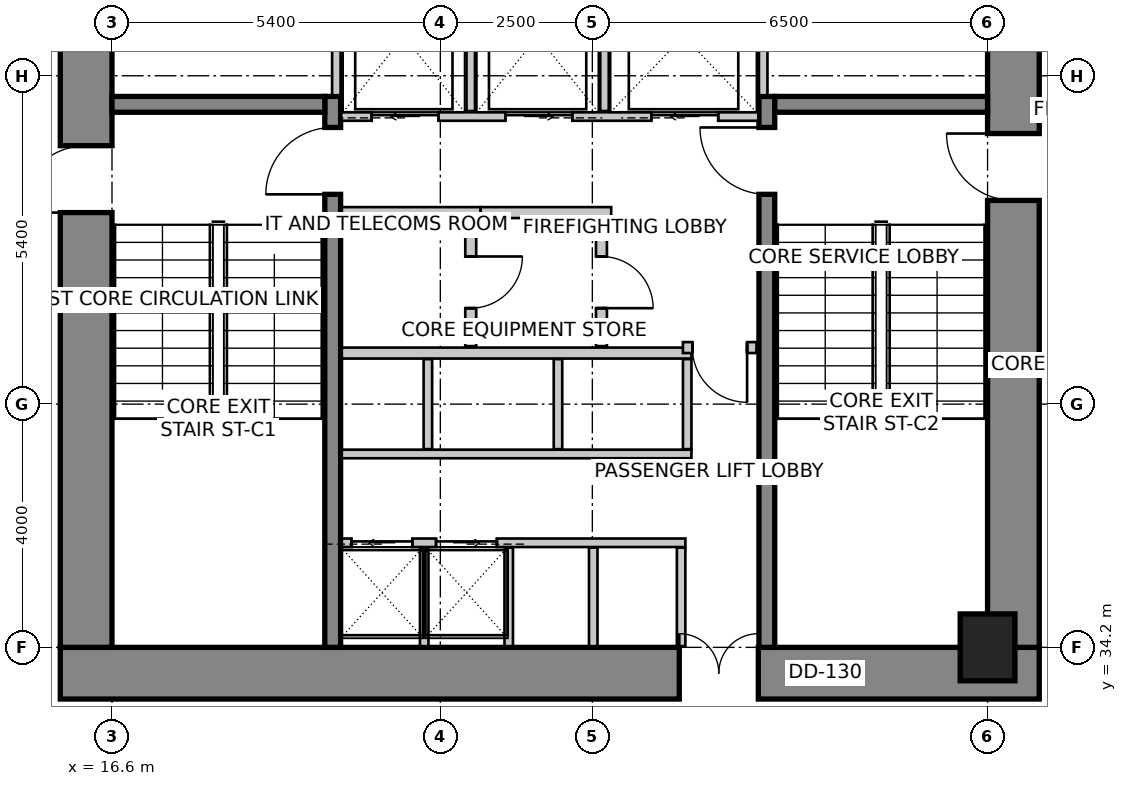
"""IFC4 building model, lengths in metres.
Left out: names, types, materials, properties, quantities, classifications, styles, units other than length and angle.
Written with IfcOpenShell. Run it as: python <this file> out.ifc"""

import sys

from ifc_helpers import new_model, si_unit, direction, frame, frame_2d, origin, origin_2d, place, context, subcontext, project, spatial, rectangle, extrude, source, transform, mapped, element, fill, save


model = new_model("IFC4")
c1 = context("Model", 3, precision=1e-05, world=origin(), true_north=direction((0.0, 1.0)))
c2 = subcontext(c1, "Body", "Model", "MODEL_VIEW")
j1 = project(units=[si_unit("LENGTHUNIT", "METRE"), si_unit("PLANEANGLEUNIT", "RADIAN")], contexts=[c1])
p1 = place(None, origin())
s1 = spatial("IfcSite", under=j1, at=p1, CompositionType="ELEMENT")
p2 = place(p1, origin())
s2 = spatial("IfcBuilding", under=s1, at=p2, CompositionType="ELEMENT")
p3 = place(p2, frame((0.0, 0.0, 59.0)))
s3 = spatial("IfcBuildingStorey", under=s2, at=p3, CompositionType="ELEMENT", Elevation=59.0)
p4 = place(p3, frame((15.75, 33.775, 0.0), z_axis=(0.0, 0.0, 1.0), x_axis=(1.0, 0.0, 0.0)))
e1 = element("IfcWall", 1, at=p4, inside=s3, PredefinedType="SHEAR", context=c2, shape_type="SweptSolid", body=[
    extrude(rectangle(XDim=16.1, YDim=0.85, at=frame_2d((8.05, 0.0))), origin(), (0.0, 0.0, 1.0), 4.0),
])
m1 = source(origin(), c2, "Body", "SweptSolid", [
    extrude(rectangle(XDim=1.3, YDim=2.15, at=frame_2d((0.65, 1.075))), frame((0.0, 0.435, 0.0), z_axis=(0.0, -1.0, 0.0), x_axis=(1.0, 0.0, 0.0)), (0.0, 0.0, 1.0), 0.87),
])
p5 = place(p4, frame((10.18, 0.0, 0.0)))
e2 = element("IfcOpeningElement", 2, at=p5, cuts=e1, PredefinedType="OPENING", context=c2, shape_type="MappedRepresentation", body=[
    mapped(m1, transform((0.0, 0.0, 0.0), scale=1.0)),
])
p6 = place(p3, frame((16.175, 34.2, 0.0), z_axis=(0.0, 0.0, 1.0), x_axis=(0.0, 1.0, 0.0)))
e3 = element("IfcWall", 3, at=p6, inside=s3, PredefinedType="SHEAR", context=c2, shape_type="SweptSolid", body=[
    extrude(rectangle(XDim=11.4, YDim=0.85, at=frame_2d((5.7, 0.0))), origin(), (0.0, 0.0, 1.0), 4.0),
])
m2 = source(origin(), c2, "Body", "SweptSolid", [
    extrude(rectangle(XDim=1.1, YDim=2.15, at=frame_2d((0.55, 1.075))), frame((0.0, 0.435, 0.0), z_axis=(0.0, -1.0, 0.0), x_axis=(1.0, 0.0, 0.0)), (0.0, 0.0, 1.0), 0.87),
])
p7 = place(p6, frame((7.15, 0.0, 0.0)))
e4 = element("IfcOpeningElement", 4, at=p7, cuts=e3, PredefinedType="OPENING", context=c2, shape_type="MappedRepresentation", body=[
    mapped(m2, transform((0.0, 0.0, 0.0), scale=1.0)),
])
p8 = place(p3, frame((31.425, 34.2, 0.0), z_axis=(0.0, 0.0, 1.0), x_axis=(0.0, 1.0, 0.0)))
e5 = element("IfcWall", 5, at=p8, inside=s3, PredefinedType="SHEAR", context=c2, shape_type="SweptSolid", body=[
    extrude(rectangle(XDim=11.4, YDim=0.85, at=frame_2d((5.7, 0.0))), origin(), (0.0, 0.0, 1.0), 4.0),
])
p9 = place(p8, frame((7.35, 0.0, 0.0)))
e6 = element("IfcOpeningElement", 6, at=p9, cuts=e5, PredefinedType="OPENING", context=c2, shape_type="MappedRepresentation", body=[
    mapped(m2, transform((0.0, 0.0, 0.0), scale=1.0)),
])
p10 = place(p3, frame((20.23, 34.2, 0.0), z_axis=(0.0, 0.0, 1.0), x_axis=(0.0, 1.0, 0.0)))
e7 = element("IfcWall", 7, at=p10, inside=s3, PredefinedType="SHEAR", context=c2, shape_type="SweptSolid", body=[
    extrude(rectangle(XDim=9.06, YDim=0.26, at=frame_2d((4.53, 0.0))), origin(), (0.0, 0.0, 1.0), 4.0),
])
m3 = source(origin(), c2, "Body", "SweptSolid", [
    extrude(rectangle(XDim=1.1, YDim=2.15, at=frame_2d((0.55, 1.075))), frame((0.0, 0.14, 0.0), z_axis=(0.0, -1.0, 0.0), x_axis=(1.0, 0.0, 0.0)), (0.0, 0.0, 1.0), 0.28),
])
p11 = place(p10, frame((7.45, 0.0, 0.0)))
e8 = element("IfcOpeningElement", 8, at=p11, cuts=e7, PredefinedType="OPENING", context=c2, shape_type="MappedRepresentation", body=[
    mapped(m3, transform((0.0, 0.0, 0.0), scale=1.0)),
])
p12 = place(p3, frame((27.37, 34.2, 0.0), z_axis=(0.0, 0.0, 1.0), x_axis=(0.0, 1.0, 0.0)))
e9 = element("IfcWall", 9, at=p12, inside=s3, PredefinedType="SHEAR", context=c2, shape_type="SweptSolid", body=[
    extrude(rectangle(XDim=9.06, YDim=0.26, at=frame_2d((4.53, 0.0))), origin(), (0.0, 0.0, 1.0), 4.0),
])
p13 = place(p12, frame((7.45, 0.0, 0.0)))
e10 = element("IfcOpeningElement", 10, at=p13, cuts=e9, PredefinedType="OPENING", context=c2, shape_type="MappedRepresentation", body=[
    mapped(m3, transform((0.0, 0.0, 0.0), scale=1.0)),
])
for number, where, z_axis, x_axis in (
    (11, (16.6, 43.13, 0.0), (0.0, 0.0, 1.0), (1.0, 0.0, 0.0)),
    (12, (27.5, 43.13, 0.0), (0.0, 0.0, 1.0), (1.0, 0.0, 0.0)),
):
    element("IfcWall", number, at=place(p3, frame(where, z_axis=z_axis, x_axis=x_axis)), inside=s3, PredefinedType="SHEAR", context=c2, shape_type="SweptSolid", body=[
        extrude(rectangle(XDim=3.5, YDim=0.26, at=frame_2d((1.75, 0.0))), origin(), (0.0, 0.0, 1.0), 4.0),
    ])
m4 = source(origin(), c2, "Body", "SweptSolid", [
    extrude(rectangle(XDim=0.9, YDim=1.1, at=origin_2d()), origin(), (0.0, 0.0, 1.0), 4.0),
])
p14 = place(p3, frame((31.0, 34.2, 0.0), z_axis=(0.0, 0.0, 1.0), x_axis=(1.0, 0.0, 0.0)))
e13 = element("IfcColumn", 13, at=p14, inside=s3, PredefinedType="COLUMN", context=c2, shape_type="MappedRepresentation", body=[
    mapped(m4, transform((0.0, 0.0, 0.0), scale=1.0)),
])
p15 = place(p3, frame((20.37, 42.93, 0.0), z_axis=(0.0, 0.0, 1.0), x_axis=(1.0, 0.0, 0.0)))
e14 = element("IfcWall", 14, at=p15, inside=s3, PredefinedType="SOLIDWALL", context=c2, shape_type="SweptSolid", body=[
    extrude(rectangle(XDim=6.86, YDim=0.14, at=frame_2d((3.43, 0.0))), origin(), (0.0, 0.0, 1.0), 3.7),
])
m5 = source(origin(), c2, "Body", "SweptSolid", [
    extrude(rectangle(XDim=1.1, YDim=2.15, at=frame_2d((0.55, 1.075))), frame((0.0, 0.08, 0.0), z_axis=(0.0, -1.0, 0.0), x_axis=(1.0, 0.0, 0.0)), (0.0, 0.0, 1.0), 0.16),
])
p16 = place(p15, frame((0.5, 0.0, 0.0)))
e15 = element("IfcOpeningElement", 15, at=p16, cuts=e14, PredefinedType="OPENING", context=c2, shape_type="MappedRepresentation", body=[
    mapped(m5, transform((0.0, 0.0, 0.0), scale=1.0)),
])
p17 = place(p15, frame((2.7, 0.0, 0.0)))
e16 = element("IfcOpeningElement", 16, at=p17, cuts=e14, PredefinedType="OPENING", context=c2, shape_type="MappedRepresentation", body=[
    mapped(m5, transform((0.0, 0.0, 0.0), scale=1.0)),
])
p18 = place(p15, frame((5.1, 0.0, 0.0)))
e17 = element("IfcOpeningElement", 17, at=p18, cuts=e14, PredefinedType="OPENING", context=c2, shape_type="MappedRepresentation", body=[
    mapped(m5, transform((0.0, 0.0, 0.0), scale=1.0)),
])
for number, where, z_axis, x_axis in (
    (18, (20.29, 43.28, 0.0), (0.0, 0.0, 1.0), (0.0, 1.0, 0.0)),
    (19, (27.31, 43.28, 0.0), (0.0, 0.0, 1.0), (0.0, 1.0, 0.0)),
):
    element("IfcWall", number, at=place(p3, frame(where, z_axis=z_axis, x_axis=x_axis)), inside=s3, PredefinedType="SOLIDWALL", context=c2, shape_type="SweptSolid", body=[
        extrude(rectangle(XDim=2.3, YDim=0.14, at=frame_2d((1.15, 0.0))), origin(), (0.0, 0.0, 1.0), 3.7),
    ])
for number, where, z_axis, x_axis in (
    (20, (22.5, 43.02, 0.0), (0.0, 0.0, 1.0), (0.0, 1.0, 0.0)),
    (21, (24.7, 43.02, 0.0), (0.0, 0.0, 1.0), (0.0, 1.0, 0.0)),
):
    element("IfcWall", number, at=place(p3, frame(where, z_axis=z_axis, x_axis=x_axis)), inside=s3, PredefinedType="SOLIDWALL", context=c2, shape_type="SweptSolid", body=[
        extrude(rectangle(XDim=2.56, YDim=0.14, at=frame_2d((1.28, 0.0))), origin(), (0.0, 0.0, 1.0), 3.7),
    ])
p19 = place(p3, frame((20.38, 35.92, 0.0), z_axis=(0.0, 0.0, 1.0), x_axis=(1.0, 0.0, 0.0)))
e22 = element("IfcWall", 22, at=p19, inside=s3, PredefinedType="SOLIDWALL", context=c2, shape_type="SweptSolid", body=[
    extrude(rectangle(XDim=5.65, YDim=0.14, at=frame_2d((2.825, 0.0))), origin(), (0.0, 0.0, 1.0), 3.7),
])
m6 = source(origin(), c2, "Body", "SweptSolid", [
    extrude(rectangle(XDim=1.0, YDim=2.15, at=frame_2d((0.5, 1.075))), frame((0.0, 0.08, 0.0), z_axis=(0.0, -1.0, 0.0), x_axis=(1.0, 0.0, 0.0)), (0.0, 0.0, 1.0), 0.16),
])
p20 = place(p19, frame((0.16, 0.0, 0.0)))
e23 = element("IfcOpeningElement", 23, at=p20, cuts=e22, PredefinedType="OPENING", context=c2, shape_type="MappedRepresentation", body=[
    mapped(m6, transform((0.0, 0.0, 0.0), scale=1.0)),
])
p21 = place(p19, frame((1.55, 0.0, 0.0)))
e24 = element("IfcOpeningElement", 24, at=p21, cuts=e22, PredefinedType="OPENING", context=c2, shape_type="MappedRepresentation", body=[
    mapped(m6, transform((0.0, 0.0, 0.0), scale=1.0)),
])
for number, where, z_axis, x_axis in (
    (25, (25.96, 34.22, 0.0), (0.0, 0.0, 1.0), (0.0, 1.0, 0.0)),
    (26, (21.735, 34.22, 0.0), (0.0, 0.0, 1.0), (0.0, 1.0, 0.0)),
    (27, (23.125, 34.22, 0.0), (0.0, 0.0, 1.0), (0.0, 1.0, 0.0)),
    (28, (24.515, 34.22, 0.0), (0.0, 0.0, 1.0), (0.0, 1.0, 0.0)),
):
    element("IfcWall", number, at=place(p3, frame(where, z_axis=z_axis, x_axis=x_axis)), inside=s3, PredefinedType="SOLIDWALL", context=c2, shape_type="SweptSolid", body=[
        extrude(rectangle(XDim=1.62, YDim=0.14, at=frame_2d((0.81, 0.0))), origin(), (0.0, 0.0, 1.0), 2.992),
    ])
p22 = place(p3, frame((20.38, 37.38, 0.0), z_axis=(0.0, 0.0, 1.0), x_axis=(1.0, 0.0, 0.0)))
e29 = element("IfcWall", 29, at=p22, inside=s3, PredefinedType="SOLIDWALL", context=c2, shape_type="SweptSolid", body=[
    extrude(rectangle(XDim=5.75, YDim=0.14, at=frame_2d((2.875, 0.0))), origin(), (0.0, 0.0, 1.0), 3.7),
])
p23 = place(p3, frame((20.38, 39.04, 0.0), z_axis=(0.0, 0.0, 1.0), x_axis=(1.0, 0.0, 0.0)))
e30 = element("IfcWall", 30, at=p23, inside=s3, PredefinedType="SOLIDWALL", context=c2, shape_type="SweptSolid", body=[
    extrude(rectangle(XDim=5.75, YDim=0.18, at=frame_2d((2.875, 0.0))), origin(), (0.0, 0.0, 1.0), 3.7),
])
for number, where, z_axis, x_axis in (
    (31, (26.06, 37.46, 0.0), (0.0, 0.0, 1.0), (0.0, 1.0, 0.0)),
    (32, (21.795, 37.46, 0.0), (0.0, 0.0, 1.0), (0.0, 1.0, 0.0)),
    (33, (23.935, 37.46, 0.0), (0.0, 0.0, 1.0), (0.0, 1.0, 0.0)),
):
    element("IfcWall", number, at=place(p3, frame(where, z_axis=z_axis, x_axis=x_axis)), inside=s3, PredefinedType="SOLIDWALL", context=c2, shape_type="SweptSolid", body=[
        extrude(rectangle(XDim=1.48, YDim=0.14, at=frame_2d((0.74, 0.0))), origin(), (0.0, 0.0, 1.0), 3.7),
    ])
p24 = place(p3, frame((22.66, 41.35, 0.0), z_axis=(0.0, 0.0, 1.0), x_axis=(-1.0, 0.0, 0.0)))
e34 = element("IfcWall", 34, at=p24, inside=s3, PredefinedType="PARTITIONING", context=c2, shape_type="SweptSolid", body=[
    extrude(rectangle(XDim=2.28, YDim=0.18, at=frame_2d((1.14, 0.0))), origin(), (0.0, 0.0, 1.0), 3.7),
])
p25 = place(p3, frame((24.81, 41.35, 0.0), z_axis=(0.0, 0.0, 1.0), x_axis=(-1.0, 0.0, 0.0)))
e35 = element("IfcWall", 35, at=p25, inside=s3, PredefinedType="PARTITIONING", context=c2, shape_type="SweptSolid", body=[
    extrude(rectangle(XDim=2.148, YDim=0.18, at=frame_2d((1.074, 0.0))), origin(), (0.0, 0.0, 1.0), 3.7),
])
p26 = place(p3, frame((22.5, 41.256, 0.0), z_axis=(0.0, 0.0, 1.0), x_axis=(0.0, -1.0, 0.0)))
e36 = element("IfcWall", 36, at=p26, inside=s3, PredefinedType="PARTITIONING", context=c2, shape_type="SweptSolid", body=[
    extrude(rectangle(XDim=2.106, YDim=0.18, at=frame_2d((1.053, 0.0))), origin(), (0.0, 0.0, 1.0), 3.7),
])
m7 = source(origin(), c2, "Body", "SweptSolid", [
    extrude(rectangle(XDim=0.85, YDim=2.15, at=frame_2d((0.425, 1.075))), frame((0.0, 0.1, 0.0), z_axis=(0.0, -1.0, 0.0), x_axis=(1.0, 0.0, 0.0)), (0.0, 0.0, 1.0), 0.2),
])
p27 = place(p26, frame((0.628, 0.0, 0.0)))
e37 = element("IfcOpeningElement", 37, at=p27, cuts=e36, PredefinedType="OPENING", context=c2, shape_type="MappedRepresentation", body=[
    mapped(m7, transform((0.0, 0.0, 0.0), scale=1.0)),
])
p28 = place(p3, frame((24.65, 41.256, 0.0), z_axis=(0.0, 0.0, 1.0), x_axis=(0.0, -1.0, 0.0)))
e38 = element("IfcWall", 38, at=p28, inside=s3, PredefinedType="PARTITIONING", context=c2, shape_type="SweptSolid", body=[
    extrude(rectangle(XDim=2.106, YDim=0.18, at=frame_2d((1.053, 0.0))), origin(), (0.0, 0.0, 1.0), 3.7),
])
p29 = place(p28, frame((0.628, 0.0, 0.0)))
e39 = element("IfcOpeningElement", 39, at=p29, cuts=e38, PredefinedType="OPENING", context=c2, shape_type="MappedRepresentation", body=[
    mapped(m7, transform((0.0, 0.0, 0.0), scale=1.0)),
])
p30 = place(p3, frame((27.2, 39.13, 0.0), z_axis=(0.0, 0.0, 1.0), x_axis=(-1.0, 0.0, 0.0)))
e40 = element("IfcWall", 40, at=p30, inside=s3, PredefinedType="PARTITIONING", context=c2, shape_type="SweptSolid", body=[
    extrude(rectangle(XDim=1.21, YDim=0.18, at=frame_2d((0.605, 0.0))), origin(), (0.0, 0.0, 1.0), 3.7),
])
m8 = source(origin(), c2, "Body", "SweptSolid", [
    extrude(rectangle(XDim=0.9, YDim=2.15, at=frame_2d((0.45, 1.075))), frame((0.0, 0.1, 0.0), z_axis=(0.0, -1.0, 0.0), x_axis=(1.0, 0.0, 0.0)), (0.0, 0.0, 1.0), 0.2),
])
p31 = place(p30, frame((0.155, 0.0, 0.0)))
e41 = element("IfcOpeningElement", 41, at=p31, cuts=e40, PredefinedType="OPENING", context=c2, shape_type="MappedRepresentation", body=[
    mapped(m8, transform((0.0, 0.0, 0.0), scale=1.0)),
])
m9 = source(origin(), c2, "Body", "SweptSolid", [
    extrude(rectangle(XDim=1.1, YDim=2.15, at=frame_2d((0.55, 1.075))), frame((0.0, 0.025, 0.0), z_axis=(0.0, -1.0, 0.0), x_axis=(1.0, 0.0, 0.0)), (0.0, 0.0, 1.0), 0.05),
])
p32 = place(p16, origin())
e42 = element("IfcDoor", 42, at=p32, inside=s3, OperationType="SLIDING_TO_LEFT", PredefinedType="DOOR", context=c2, shape_type="MappedRepresentation", body=[
    mapped(m9, transform((0.0, 0.0, 0.0), scale=1.0)),
])
fill(e15, e42)
p33 = place(p17, origin())
e43 = element("IfcDoor", 43, at=p33, inside=s3, OperationType="SLIDING_TO_RIGHT", PredefinedType="DOOR", context=c2, shape_type="MappedRepresentation", body=[
    mapped(m9, transform((0.0, 0.0, 0.0), scale=1.0)),
])
fill(e16, e43)
m10 = source(origin(), c2, "Body", "SweptSolid", [
    extrude(rectangle(XDim=1.1, YDim=2.15, at=frame_2d((0.55, 1.075))), frame((0.0, 0.025, 0.0), z_axis=(0.0, -1.0, 0.0), x_axis=(1.0, 0.0, 0.0)), (0.0, 0.0, 1.0), 0.05),
])
p34 = place(p18, origin())
e44 = element("IfcDoor", 44, at=p34, inside=s3, OperationType="SLIDING_TO_LEFT", PredefinedType="DOOR", context=c2, shape_type="MappedRepresentation", body=[
    mapped(m10, transform((0.0, 0.0, 0.0), scale=1.0)),
])
fill(e17, e44)
m11 = source(origin(), c2, "Body", "SweptSolid", [
    extrude(rectangle(XDim=1.0, YDim=2.15, at=frame_2d((0.5, 1.075))), frame((0.0, 0.025, 0.0), z_axis=(0.0, -1.0, 0.0), x_axis=(1.0, 0.0, 0.0)), (0.0, 0.0, 1.0), 0.05),
])
p35 = place(p20, origin())
e45 = element("IfcDoor", 45, at=p35, inside=s3, OperationType="SLIDING_TO_LEFT", PredefinedType="DOOR", context=c2, shape_type="MappedRepresentation", body=[
    mapped(m11, transform((0.0, 0.0, 0.0), scale=1.0)),
])
fill(e23, e45)
p36 = place(p21, origin())
e46 = element("IfcDoor", 46, at=p36, inside=s3, OperationType="SLIDING_TO_RIGHT", PredefinedType="DOOR", context=c2, shape_type="MappedRepresentation", body=[
    mapped(m11, transform((0.0, 0.0, 0.0), scale=1.0)),
])
fill(e24, e46)
m12 = source(origin(), c2, "Body", "SweptSolid", [
    extrude(rectangle(XDim=1.1, YDim=2.15, at=frame_2d((0.55, 1.075))), frame((0.0, 0.025, 0.0), z_axis=(0.0, -1.0, 0.0), x_axis=(1.0, 0.0, 0.0)), (0.0, 0.0, 1.0), 0.05),
])
p37 = place(p11, origin())
e47 = element("IfcDoor", 47, at=p37, inside=s3, OperationType="SINGLE_SWING_LEFT", PredefinedType="DOOR", context=c2, shape_type="MappedRepresentation", body=[
    mapped(m12, transform((0.0, 0.0, 0.0), scale=1.0)),
])
fill(e8, e47)
p38 = place(p13, origin())
e48 = element("IfcDoor", 48, at=p38, inside=s3, OperationType="SINGLE_SWING_RIGHT", PredefinedType="DOOR", context=c2, shape_type="MappedRepresentation", body=[
    mapped(m12, transform((0.0, 0.0, 0.0), scale=1.0)),
])
fill(e10, e48)
p39 = place(p7, origin())
e49 = element("IfcDoor", 49, at=p39, inside=s3, OperationType="SINGLE_SWING_LEFT", PredefinedType="DOOR", context=c2, shape_type="MappedRepresentation", body=[
    mapped(m12, transform((0.0, 0.0, 0.0), scale=1.0)),
])
fill(e4, e49)
p40 = place(p9, origin())
e50 = element("IfcDoor", 50, at=p40, inside=s3, OperationType="SINGLE_SWING_RIGHT", PredefinedType="DOOR", context=c2, shape_type="MappedRepresentation", body=[
    mapped(m12, transform((0.0, 0.0, 0.0), scale=1.0)),
])
fill(e6, e50)
m13 = source(origin(), c2, "Body", "SweptSolid", [
    extrude(rectangle(XDim=1.3, YDim=2.15, at=frame_2d((0.65, 1.075))), frame((0.0, 0.025, 0.0), z_axis=(0.0, -1.0, 0.0), x_axis=(1.0, 0.0, 0.0)), (0.0, 0.0, 1.0), 0.05),
])
p41 = place(p5, origin())
e51 = element("IfcDoor", 51, at=p41, inside=s3, OperationType="DOUBLE_DOOR_SINGLE_SWING", PredefinedType="DOOR", context=c2, shape_type="MappedRepresentation", body=[
    mapped(m13, transform((0.0, 0.0, 0.0), scale=1.0)),
])
fill(e2, e51)
m14 = source(origin(), c2, "Body", "SweptSolid", [
    extrude(rectangle(XDim=0.85, YDim=2.15, at=frame_2d((0.425, 1.075))), frame((0.0, 0.025, 0.0), z_axis=(0.0, -1.0, 0.0), x_axis=(1.0, 0.0, 0.0)), (0.0, 0.0, 1.0), 0.05),
])
p42 = place(p27, origin())
e52 = element("IfcDoor", 52, at=p42, inside=s3, OperationType="SINGLE_SWING_LEFT", PredefinedType="DOOR", context=c2, shape_type="MappedRepresentation", body=[
    mapped(m14, transform((0.0, 0.0, 0.0), scale=1.0)),
])
fill(e37, e52)
p43 = place(p29, origin())
e53 = element("IfcDoor", 53, at=p43, inside=s3, OperationType="SINGLE_SWING_RIGHT", PredefinedType="DOOR", context=c2, shape_type="MappedRepresentation", body=[
    mapped(m14, transform((0.0, 0.0, 0.0), scale=1.0)),
])
fill(e39, e53)
m15 = source(origin(), c2, "Body", "SweptSolid", [
    extrude(rectangle(XDim=0.9, YDim=2.15, at=frame_2d((0.45, 1.075))), frame((0.0, 0.025, 0.0), z_axis=(0.0, -1.0, 0.0), x_axis=(1.0, 0.0, 0.0)), (0.0, 0.0, 1.0), 0.05),
])
p44 = place(p31, origin())
e54 = element("IfcDoor", 54, at=p44, inside=s3, OperationType="SINGLE_SWING_LEFT", PredefinedType="DOOR", context=c2, shape_type="MappedRepresentation", body=[
    mapped(m15, transform((0.0, 0.0, 0.0), scale=1.0)),
])
fill(e41, e54)
save(model, sys.argv[1])
